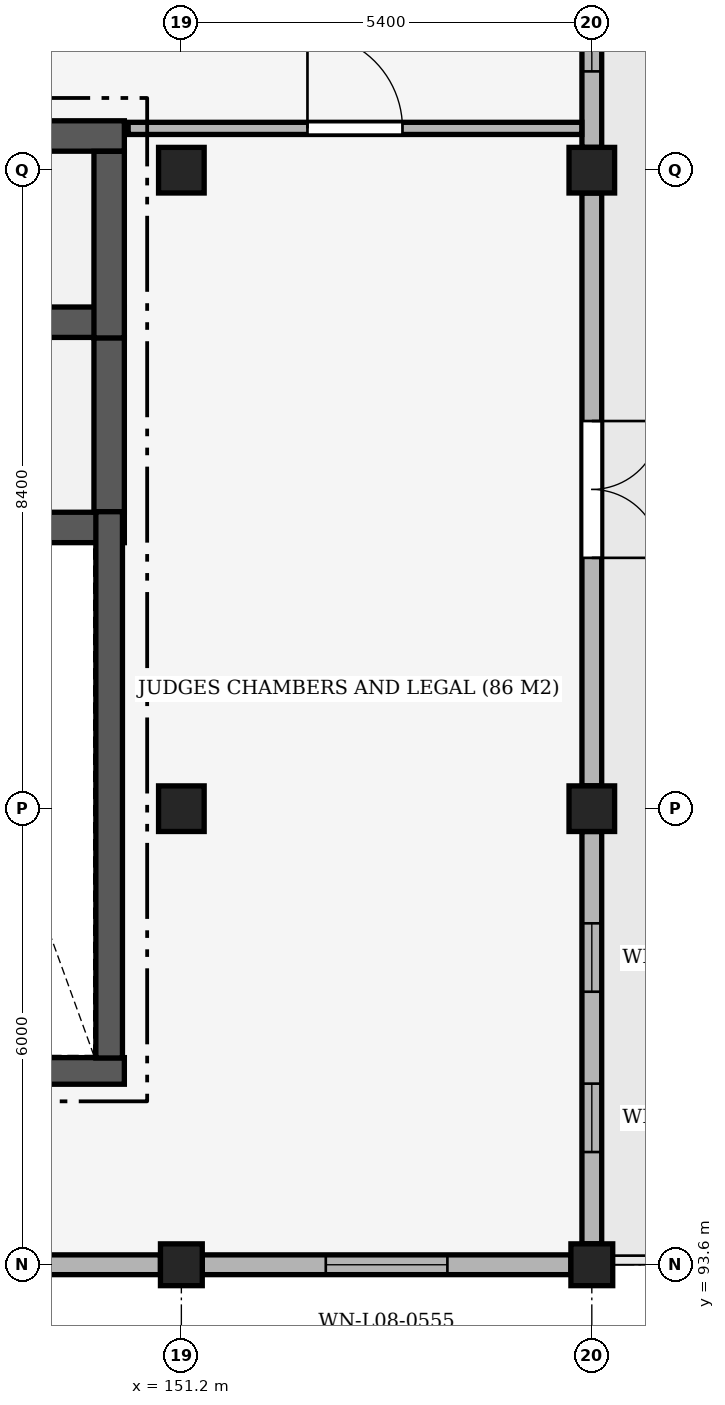
"""IFC4 building model, lengths in metres.
Left out: names, types, materials, properties, quantities, classifications, styles, units other than length and angle.
Written with IfcOpenShell. Run it as: python <this file> out.ifc"""

import sys

from ifc_helpers import new_model, si_unit, direction, frame, frame_2d, origin, origin_2d, place, context, subcontext, project, spatial, rectangle, extrude, element, fill, save


model = new_model("IFC4")
c1 = context("Model", 3, precision=1e-05, world=origin(), true_north=direction((0.0, 1.0)))
c2 = subcontext(c1, "Body", "Model", "MODEL_VIEW")
j1 = project(units=[si_unit("LENGTHUNIT", "METRE"), si_unit("PLANEANGLEUNIT", "RADIAN")], contexts=[c1])
p1 = place(None, origin())
s1 = spatial("IfcSite", under=j1, at=p1, CompositionType="ELEMENT")
p2 = place(p1, origin())
s2 = spatial("IfcBuilding", under=s1, at=p2, CompositionType="ELEMENT")
p3 = place(p2, frame((0.0, 0.0, 37.8)))
s3 = spatial("IfcBuildingStorey", under=s2, at=p3, CompositionType="ELEMENT", Elevation=37.8)
p4 = place(p3, frame((151.2, 93.6, 0.0), z_axis=(0.0, 0.0, 1.0), x_axis=(1.0, 0.0, 0.0)))
e1 = element("IfcColumn", 1, at=p4, inside=s3, PredefinedType="COLUMN", context=c2, shape_type="SweptSolid", body=[
    extrude(rectangle(XDim=0.55, YDim=0.55, at=origin_2d()), origin(), (0.0, 0.0, 1.0), 4.2),
])
for number, where, z_axis, x_axis in (
    (2, (151.2, 99.6, 0.0), (0.0, 0.0, 1.0), (1.0, 0.0, 0.0)),
    (3, (151.2, 108.0, 0.0), (0.0, 0.0, 1.0), (1.0, 0.0, 0.0)),
):
    element("IfcColumn", number, at=place(p3, frame(where, z_axis=z_axis, x_axis=x_axis)), inside=s3, PredefinedType="COLUMN", context=c2, shape_type="SweptSolid", body=[
        extrude(rectangle(XDim=0.6, YDim=0.6, at=origin_2d()), origin(), (0.0, 0.0, 1.0), 4.2),
    ])
p5 = place(p3, frame((156.6, 93.6, 0.0), z_axis=(0.0, 0.0, 1.0), x_axis=(1.0, 0.0, 0.0)))
e4 = element("IfcColumn", 4, at=p5, inside=s3, PredefinedType="COLUMN", context=c2, shape_type="SweptSolid", body=[
    extrude(rectangle(XDim=0.55, YDim=0.55, at=origin_2d()), origin(), (0.0, 0.0, 1.0), 4.2),
])
for number, where, z_axis, x_axis in (
    (5, (156.6, 99.6, 0.0), (0.0, 0.0, 1.0), (1.0, 0.0, 0.0)),
    (6, (156.6, 108.0, 0.0), (0.0, 0.0, 1.0), (1.0, 0.0, 0.0)),
):
    element("IfcColumn", number, at=place(p3, frame(where, z_axis=z_axis, x_axis=x_axis)), inside=s3, PredefinedType="COLUMN", context=c2, shape_type="SweptSolid", body=[
        extrude(rectangle(XDim=0.6, YDim=0.6, at=origin_2d()), origin(), (0.0, 0.0, 1.0), 4.2),
    ])
p6 = place(p3, frame((156.6, 113.1, 0.0), z_axis=(0.0, 0.0, 1.0), x_axis=(0.0, -1.0, 0.0)))
e7 = element("IfcWall", 7, at=p6, inside=s3, PredefinedType="SOLIDWALL", context=c2, shape_type="SweptSolid", body=[
    extrude(rectangle(XDim=4.8, YDim=0.26, at=frame_2d((2.4, 0.0))), origin(), (0.0, 0.0, 1.0), 3.41),
])
p7 = place(p6, frame((1.0, 0.0, 0.9)))
e8 = element("IfcOpeningElement", 8, at=p7, cuts=e7, PredefinedType="OPENING", context=c2, shape_type="SweptSolid", body=[
    extrude(rectangle(XDim=0.9, YDim=2.2, at=frame_2d((0.45, 1.1))), frame((0.0, 0.145, 0.0), z_axis=(0.0, -1.0, 0.0), x_axis=(1.0, 0.0, 0.0)), (0.0, 0.0, 1.0), 0.29),
])
p8 = place(p6, frame((2.9, 0.0, 0.9)))
e9 = element("IfcOpeningElement", 9, at=p8, cuts=e7, PredefinedType="OPENING", context=c2, shape_type="SweptSolid", body=[
    extrude(rectangle(XDim=0.9, YDim=2.2, at=frame_2d((0.45, 1.1))), frame((0.0, 0.145, 0.0), z_axis=(0.0, -1.0, 0.0), x_axis=(1.0, 0.0, 0.0)), (0.0, 0.0, 1.0), 0.29),
])
p9 = place(p3, frame((156.6, 107.7, 0.0), z_axis=(0.0, 0.0, 1.0), x_axis=(0.0, -1.0, 0.0)))
e10 = element("IfcWall", 10, at=p9, inside=s3, PredefinedType="SOLIDWALL", context=c2, shape_type="SweptSolid", body=[
    extrude(rectangle(XDim=7.8, YDim=0.26, at=frame_2d((3.9, 0.0))), origin(), (0.0, 0.0, 1.0), 3.26),
])
p10 = place(p9, frame((3.0, 0.0, 0.0)))
e11 = element("IfcOpeningElement", 11, at=p10, cuts=e10, PredefinedType="OPENING", context=c2, shape_type="SweptSolid", body=[
    extrude(rectangle(XDim=1.8, YDim=2.2, at=frame_2d((0.9, 1.1))), frame((0.0, 0.145, 0.0), z_axis=(0.0, -1.0, 0.0), x_axis=(1.0, 0.0, 0.0)), (0.0, 0.0, 1.0), 0.29),
])
p11 = place(p3, frame((156.6, 99.3, 0.0), z_axis=(0.0, 0.0, 1.0), x_axis=(0.0, -1.0, 0.0)))
e12 = element("IfcWall", 12, at=p11, inside=s3, PredefinedType="SOLIDWALL", context=c2, shape_type="SweptSolid", body=[
    extrude(rectangle(XDim=5.425, YDim=0.26, at=frame_2d((2.712, 0.0))), origin(), (0.0, 0.0, 1.0), 3.41),
])
p12 = place(p11, frame((1.208, 0.0, 0.9)))
e13 = element("IfcOpeningElement", 13, at=p12, cuts=e12, PredefinedType="OPENING", context=c2, shape_type="SweptSolid", body=[
    extrude(rectangle(XDim=0.9, YDim=2.2, at=frame_2d((0.45, 1.1))), frame((0.0, 0.145, 0.0), z_axis=(0.0, -1.0, 0.0), x_axis=(1.0, 0.0, 0.0)), (0.0, 0.0, 1.0), 0.29),
])
p13 = place(p11, frame((3.317, 0.0, 0.9)))
e14 = element("IfcOpeningElement", 14, at=p13, cuts=e12, PredefinedType="OPENING", context=c2, shape_type="SweptSolid", body=[
    extrude(rectangle(XDim=0.9, YDim=2.2, at=frame_2d((0.45, 1.1))), frame((0.0, 0.145, 0.0), z_axis=(0.0, -1.0, 0.0), x_axis=(1.0, 0.0, 0.0)), (0.0, 0.0, 1.0), 0.29),
])
p14 = place(p3, frame((156.325, 93.6, 0.0), z_axis=(0.0, 0.0, 1.0), x_axis=(-1.0, 0.0, 0.0)))
e15 = element("IfcWall", 15, at=p14, inside=s3, PredefinedType="SOLIDWALL", context=c2, shape_type="SweptSolid", body=[
    extrude(rectangle(XDim=4.85, YDim=0.26, at=frame_2d((2.425, 0.0))), origin(), (0.0, 0.0, 1.0), 3.36),
])
p15 = place(p14, frame((1.625, 0.0, 1.05)))
e16 = element("IfcOpeningElement", 16, at=p15, cuts=e15, PredefinedType="OPENING", context=c2, shape_type="SweptSolid", body=[
    extrude(rectangle(XDim=1.6, YDim=1.8, at=frame_2d((0.8, 0.9))), frame((0.0, 0.145, 0.0), z_axis=(0.0, -1.0, 0.0), x_axis=(1.0, 0.0, 0.0)), (0.0, 0.0, 1.0), 0.29),
])
p16 = place(p3, frame((150.925, 93.6, 0.0), z_axis=(0.0, 0.0, 1.0), x_axis=(-1.0, 0.0, 0.0)))
e17 = element("IfcWall", 17, at=p16, inside=s3, PredefinedType="SOLIDWALL", context=c2, shape_type="SweptSolid", body=[
    extrude(rectangle(XDim=7.85, YDim=0.26, at=frame_2d((3.925, 0.0))), origin(), (0.0, 0.0, 1.0), 3.26),
])
p17 = place(p16, frame((1.55, 0.0, 1.05)))
e18 = element("IfcOpeningElement", 18, at=p17, cuts=e17, PredefinedType="OPENING", context=c2, shape_type="SweptSolid", body=[
    extrude(rectangle(XDim=1.6, YDim=1.8, at=frame_2d((0.8, 0.9))), frame((0.0, 0.145, 0.0), z_axis=(0.0, -1.0, 0.0), x_axis=(1.0, 0.0, 0.0)), (0.0, 0.0, 1.0), 0.29),
])
p18 = place(p16, frame((4.7, 0.0, 1.05)))
e19 = element("IfcOpeningElement", 19, at=p18, cuts=e17, PredefinedType="OPENING", context=c2, shape_type="SweptSolid", body=[
    extrude(rectangle(XDim=1.6, YDim=1.8, at=frame_2d((0.8, 0.9))), frame((0.0, 0.145, 0.0), z_axis=(0.0, -1.0, 0.0), x_axis=(1.0, 0.0, 0.0)), (0.0, 0.0, 1.0), 0.29),
])
p19 = place(p3, frame((147.543, 103.3, 0.0), z_axis=(0.0, 0.0, 1.0), x_axis=(1.0, 0.0, 0.0)))
e20 = element("IfcWall", 20, at=p19, inside=s3, PredefinedType="SHEAR", context=c2, shape_type="SweptSolid", body=[
    extrude(rectangle(XDim=2.907, YDim=0.4, at=frame_2d((1.454, 0.0))), origin(), (0.0, 0.0, 1.0), 3.96),
])
p20 = place(p3, frame((147.15, 106.0, 0.0), z_axis=(0.0, 0.0, 1.0), x_axis=(1.0, 0.0, 0.0)))
e21 = element("IfcWall", 21, at=p20, inside=s3, PredefinedType="SHEAR", context=c2, shape_type="SweptSolid", body=[
    extrude(rectangle(XDim=3.3, YDim=0.4, at=frame_2d((1.65, 0.0))), origin(), (0.0, 0.0, 1.0), 3.96),
])
p21 = place(p3, frame((150.25, 103.502, 0.0), z_axis=(0.0, 0.0, 1.0), x_axis=(0.0, 1.0, 0.0)))
e22 = element("IfcWall", 22, at=p21, inside=s3, PredefinedType="SHEAR", context=c2, shape_type="SweptSolid", body=[
    extrude(rectangle(XDim=2.296, YDim=0.4, at=frame_2d((1.148, 0.0))), origin(), (0.0, 0.0, 1.0), 3.96),
])
p22 = place(p3, frame((147.15, 108.45, 0.0), z_axis=(0.0, 0.0, 1.0), x_axis=(1.0, 0.0, 0.0)))
e23 = element("IfcWall", 23, at=p22, inside=s3, PredefinedType="SHEAR", context=c2, shape_type="SweptSolid", body=[
    extrude(rectangle(XDim=3.3, YDim=0.4, at=frame_2d((1.65, 0.0))), origin(), (0.0, 0.0, 1.0), 3.96),
])
p23 = place(p3, frame((150.25, 105.793, 0.0), z_axis=(0.0, 0.0, 1.0), x_axis=(0.0, 1.0, 0.0)))
e24 = element("IfcWall", 24, at=p23, inside=s3, PredefinedType="SHEAR", context=c2, shape_type="SweptSolid", body=[
    extrude(rectangle(XDim=2.455, YDim=0.4, at=frame_2d((1.228, 0.0))), origin(), (0.0, 0.0, 1.0), 3.96),
])
p24 = place(p3, frame((147.6, 96.15, 0.0), z_axis=(0.0, 0.0, 1.0), x_axis=(1.0, 0.0, 0.0)))
e25 = element("IfcWall", 25, at=p24, inside=s3, PredefinedType="SHEAR", context=c2, shape_type="SweptSolid", body=[
    extrude(rectangle(XDim=2.85, YDim=0.35, at=frame_2d((1.425, 0.0))), origin(), (0.0, 0.0, 1.0), 3.96),
])
p25 = place(p3, frame((150.25, 96.32, 0.0), z_axis=(0.0, 0.0, 1.0), x_axis=(0.0, 1.0, 0.0)))
e26 = element("IfcWall", 26, at=p25, inside=s3, PredefinedType="SHEAR", context=c2, shape_type="SweptSolid", body=[
    extrude(rectangle(XDim=7.187, YDim=0.35, at=frame_2d((3.594, 0.0))), origin(), (0.0, 0.0, 1.0), 3.96),
])
p26 = place(p3, frame((150.5, 108.55, 0.0), z_axis=(0.0, 0.0, 1.0), x_axis=(1.0, 0.0, 0.0)))
e27 = element("IfcWall", 27, at=p26, inside=s3, PredefinedType="PARTITIONING", context=c2, shape_type="SweptSolid", body=[
    extrude(rectangle(XDim=5.968, YDim=0.16, at=frame_2d((2.984, 0.0))), origin(), (0.0, 0.0, 1.0), 3.41),
])
p27 = place(p26, frame((2.359, 0.0, 0.0)))
e28 = element("IfcOpeningElement", 28, at=p27, cuts=e27, PredefinedType="OPENING", context=c2, shape_type="SweptSolid", body=[
    extrude(rectangle(XDim=1.25, YDim=2.2, at=frame_2d((0.625, 1.1))), frame((0.0, 0.095, 0.0), z_axis=(0.0, -1.0, 0.0), x_axis=(1.0, 0.0, 0.0)), (0.0, 0.0, 1.0), 0.19),
])
p28 = place(p8, origin())
e29 = element("IfcWindow", 29, at=p28, inside=s3, PartitioningType="SINGLE_PANEL", PredefinedType="WINDOW", context=c2, shape_type="SweptSolid", body=[
    extrude(rectangle(XDim=0.9, YDim=2.2, at=frame_2d((0.45, 1.1))), frame((0.0, 0.03, 0.0), z_axis=(0.0, -1.0, 0.0), x_axis=(1.0, 0.0, 0.0)), (0.0, 0.0, 1.0), 0.06),
])
fill(e9, e29)
p29 = place(p10, origin())
e30 = element("IfcDoor", 30, at=p29, inside=s3, OperationType="DOUBLE_DOOR_SINGLE_SWING", PredefinedType="DOOR", context=c2, shape_type="SweptSolid", body=[
    extrude(rectangle(XDim=1.8, YDim=2.2, at=frame_2d((0.9, 1.1))), frame((0.0, 0.025, 0.0), z_axis=(0.0, -1.0, 0.0), x_axis=(1.0, 0.0, 0.0)), (0.0, 0.0, 1.0), 0.05),
])
fill(e11, e30)
p30 = place(p12, origin())
e31 = element("IfcWindow", 31, at=p30, inside=s3, PartitioningType="SINGLE_PANEL", PredefinedType="WINDOW", context=c2, shape_type="SweptSolid", body=[
    extrude(rectangle(XDim=0.9, YDim=2.2, at=frame_2d((0.45, 1.1))), frame((0.0, 0.03, 0.0), z_axis=(0.0, -1.0, 0.0), x_axis=(1.0, 0.0, 0.0)), (0.0, 0.0, 1.0), 0.06),
])
fill(e13, e31)
p31 = place(p13, origin())
e32 = element("IfcWindow", 32, at=p31, inside=s3, PartitioningType="SINGLE_PANEL", PredefinedType="WINDOW", context=c2, shape_type="SweptSolid", body=[
    extrude(rectangle(XDim=0.9, YDim=2.2, at=frame_2d((0.45, 1.1))), frame((0.0, 0.03, 0.0), z_axis=(0.0, -1.0, 0.0), x_axis=(1.0, 0.0, 0.0)), (0.0, 0.0, 1.0), 0.06),
])
fill(e14, e32)
p32 = place(p15, origin())
e33 = element("IfcWindow", 33, at=p32, inside=s3, PartitioningType="SINGLE_PANEL", PredefinedType="WINDOW", context=c2, shape_type="SweptSolid", body=[
    extrude(rectangle(XDim=1.6, YDim=1.8, at=frame_2d((0.8, 0.9))), frame((0.0, 0.03, 0.0), z_axis=(0.0, -1.0, 0.0), x_axis=(1.0, 0.0, 0.0)), (0.0, 0.0, 1.0), 0.06),
])
fill(e16, e33)
p33 = place(p27, origin())
e34 = element("IfcDoor", 34, at=p33, inside=s3, OperationType="SINGLE_SWING_LEFT", PredefinedType="DOOR", context=c2, shape_type="SweptSolid", body=[
    extrude(rectangle(XDim=1.25, YDim=2.2, at=frame_2d((0.625, 1.1))), frame((0.0, 0.025, 0.0), z_axis=(0.0, -1.0, 0.0), x_axis=(1.0, 0.0, 0.0)), (0.0, 0.0, 1.0), 0.05),
])
fill(e28, e34)
save(model, sys.argv[1])
